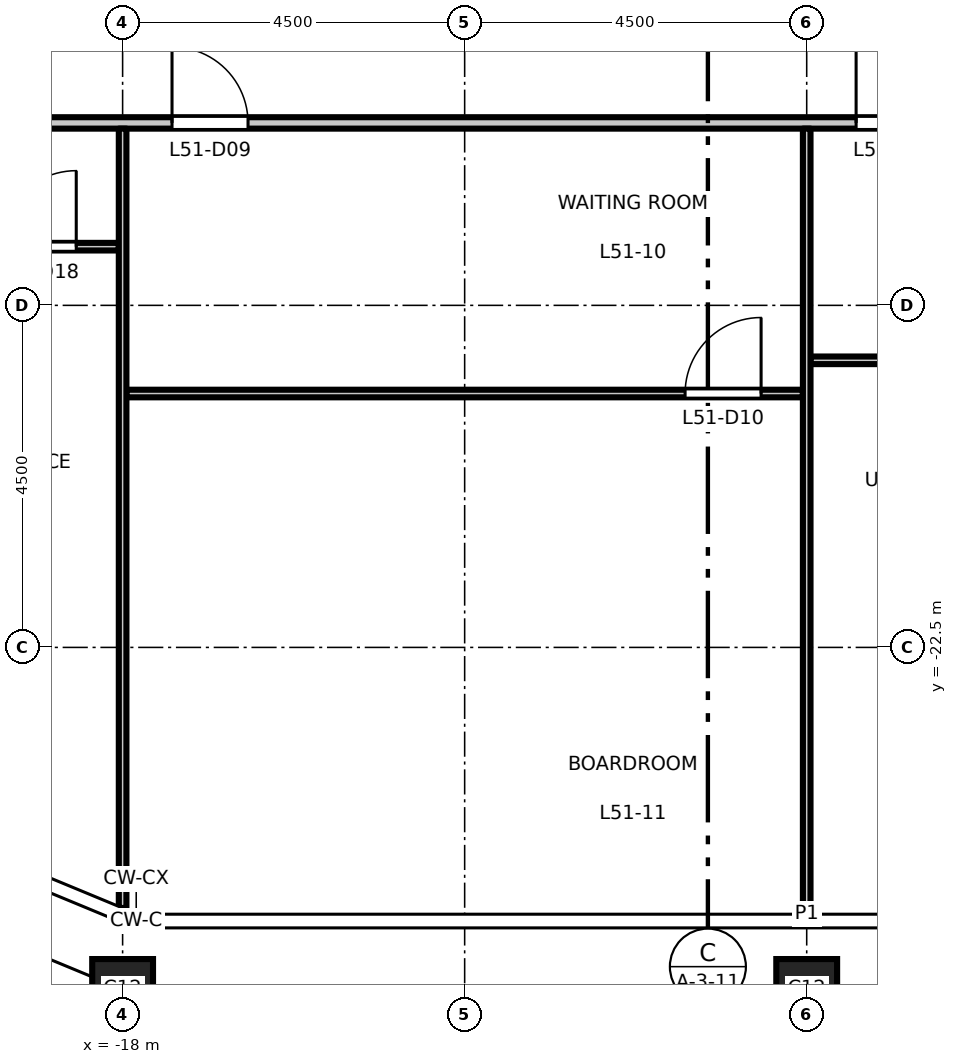
"""IFC4 building model, lengths in metres.
Left out: names, types, materials, properties, quantities, classifications, styles, units other than length and angle.
Written with IfcOpenShell. Run it as: python <this file> out.ifc"""

import sys

from ifc_helpers import new_model, si_unit, direction, frame, frame_2d, origin, origin_2d, place, context, subcontext, project, spatial, rectangle, hollow_rectangle, extrude, element, fill, save


model = new_model("IFC4")
c1 = context("Model", 3, precision=1e-05, world=origin(), true_north=direction((0.0, 1.0)))
c2 = subcontext(c1, "Body", "Model", "MODEL_VIEW")
j1 = project(units=[si_unit("LENGTHUNIT", "METRE"), si_unit("PLANEANGLEUNIT", "RADIAN")], contexts=[c1])
p1 = place(None, origin())
s1 = spatial("IfcSite", under=j1, at=p1, CompositionType="ELEMENT")
p2 = place(p1, origin())
s2 = spatial("IfcBuilding", under=s1, at=p2, CompositionType="ELEMENT")
p3 = place(p2, frame((0.0, 0.0, 237.7)))
s3 = spatial("IfcBuildingStorey", under=s2, at=p3, CompositionType="ELEMENT", Elevation=237.7)
for number, where, z_axis, x_axis in (
    (1, (-18.0, -27.0, 0.0), (0.0, 0.0, 1.0), (1.0, 0.0, 0.0)),
    (2, (-9.0, -27.0, 0.0), (0.0, 0.0, 1.0), (1.0, 0.0, 0.0)),
):
    element("IfcColumn", number, at=place(p3, frame(where, z_axis=z_axis, x_axis=x_axis)), inside=s3, PredefinedType="COLUMN", context=c2, shape_type="SweptSolid", body=[
        extrude(hollow_rectangle(XDim=0.8, YDim=0.8, WallThickness=0.045, at=origin_2d()), origin(), (0.0, 0.0, 1.0), 4.5),
    ])
p4 = place(p3, frame((-17.95, -19.16, 0.0), z_axis=(0.0, 0.0, 1.0), x_axis=(1.0, 0.0, 0.0)))
e3 = element("IfcWall", 3, at=p4, inside=s3, PredefinedType="PARTITIONING", context=c2, shape_type="SweptSolid", body=[
    extrude(rectangle(XDim=8.9, YDim=0.1, at=frame_2d((4.45, 0.0))), origin(), (0.0, 0.0, 1.0), 4.35),
])
p5 = place(p4, frame((7.35, 0.0, 0.0)))
e4 = element("IfcOpeningElement", 4, at=p5, cuts=e3, PredefinedType="OPENING", context=c2, shape_type="SweptSolid", body=[
    extrude(rectangle(XDim=1.0, YDim=2.1, at=frame_2d((0.5, 1.05))), frame((0.0, 0.06, 0.0), z_axis=(0.0, -1.0, 0.0), x_axis=(1.0, 0.0, 0.0)), (0.0, 0.0, 1.0), 0.12),
])
p6 = place(p3, frame((-8.95, -18.723, 0.0), z_axis=(0.0, 0.0, 1.0), x_axis=(1.0, 0.0, 0.0)))
e5 = element("IfcWall", 5, at=p6, inside=s3, PredefinedType="PARTITIONING", context=c2, shape_type="SweptSolid", body=[
    extrude(rectangle(XDim=8.9, YDim=0.1, at=frame_2d((4.45, 0.0))), origin(), (0.0, 0.0, 1.0), 4.35),
])
p7 = place(p6, frame((7.35, 0.0, 0.0)))
e6 = element("IfcOpeningElement", 6, at=p7, cuts=e5, PredefinedType="OPENING", context=c2, shape_type="SweptSolid", body=[
    extrude(rectangle(XDim=1.0, YDim=2.1, at=frame_2d((0.5, 1.05))), frame((0.0, 0.06, 0.0), z_axis=(0.0, -1.0, 0.0), x_axis=(1.0, 0.0, 0.0)), (0.0, 0.0, 1.0), 0.12),
])
p8 = place(p3, frame((-26.01, -17.228, 0.0), z_axis=(0.0, 0.0, 1.0), x_axis=(1.0, 0.0, 0.0)))
e7 = element("IfcWall", 7, at=p8, inside=s3, PredefinedType="PARTITIONING", context=c2, shape_type="SweptSolid", body=[
    extrude(rectangle(XDim=7.96, YDim=0.1, at=frame_2d((3.98, 0.0))), origin(), (0.0, 0.0, 1.0), 4.35),
])
p9 = place(p8, frame((6.4, 0.0, 0.0)))
e8 = element("IfcOpeningElement", 8, at=p9, cuts=e7, PredefinedType="OPENING", context=c2, shape_type="SweptSolid", body=[
    extrude(rectangle(XDim=1.0, YDim=2.1, at=frame_2d((0.5, 1.05))), frame((0.0, 0.06, 0.0), z_axis=(0.0, -1.0, 0.0), x_axis=(1.0, 0.0, 0.0)), (0.0, 0.0, 1.0), 0.12),
])
p10 = place(p3, frame((-23.925, -15.6, 0.0), z_axis=(0.0, 0.0, 1.0), x_axis=(1.0, 0.0, 0.0)))
e9 = element("IfcWall", 9, at=p10, inside=s3, PredefinedType="PARTITIONING", context=c2, shape_type="SweptSolid", body=[
    extrude(rectangle(XDim=47.85, YDim=0.15, at=frame_2d((23.925, 0.0))), origin(), (0.0, 0.0, 1.0), 4.35),
])
p11 = place(p10, frame((6.575, 0.0, 0.0)))
e10 = element("IfcOpeningElement", 10, at=p11, cuts=e9, PredefinedType="OPENING", context=c2, shape_type="SweptSolid", body=[
    extrude(rectangle(XDim=1.0, YDim=2.1, at=frame_2d((0.5, 1.05))), frame((0.0, 0.085, 0.0), z_axis=(0.0, -1.0, 0.0), x_axis=(1.0, 0.0, 0.0)), (0.0, 0.0, 1.0), 0.17),
])
p12 = place(p10, frame((15.575, 0.0, 0.0)))
e11 = element("IfcOpeningElement", 11, at=p12, cuts=e9, PredefinedType="OPENING", context=c2, shape_type="SweptSolid", body=[
    extrude(rectangle(XDim=1.0, YDim=2.1, at=frame_2d((0.5, 1.05))), frame((0.0, 0.085, 0.0), z_axis=(0.0, -1.0, 0.0), x_axis=(1.0, 0.0, 0.0)), (0.0, 0.0, 1.0), 0.17),
])
p13 = place(p10, frame((24.575, 0.0, 0.0)))
e12 = element("IfcOpeningElement", 12, at=p13, cuts=e9, PredefinedType="OPENING", context=c2, shape_type="SweptSolid", body=[
    extrude(rectangle(XDim=1.0, YDim=2.1, at=frame_2d((0.5, 1.05))), frame((0.0, 0.085, 0.0), z_axis=(0.0, -1.0, 0.0), x_axis=(1.0, 0.0, 0.0)), (0.0, 0.0, 1.0), 0.17),
])
p14 = place(p10, frame((40.325, 0.0, 0.0)))
e13 = element("IfcOpeningElement", 13, at=p14, cuts=e9, PredefinedType="OPENING", context=c2, shape_type="SweptSolid", body=[
    extrude(rectangle(XDim=1.0, YDim=2.1, at=frame_2d((0.5, 1.05))), frame((0.0, 0.085, 0.0), z_axis=(0.0, -1.0, 0.0), x_axis=(1.0, 0.0, 0.0)), (0.0, 0.0, 1.0), 0.17),
])
p15 = place(p10, frame((0.725, 0.0, 0.0)))
e14 = element("IfcOpeningElement", 14, at=p15, cuts=e9, PredefinedType="OPENING", context=c2, shape_type="SweptSolid", body=[
    extrude(rectangle(XDim=1.0, YDim=2.1, at=frame_2d((0.5, 1.05))), frame((0.0, 0.085, 0.0), z_axis=(0.0, -1.0, 0.0), x_axis=(1.0, 0.0, 0.0)), (0.0, 0.0, 1.0), 0.17),
])
p16 = place(p10, frame((42.575, 0.0, 0.0)))
e15 = element("IfcOpeningElement", 15, at=p16, cuts=e9, PredefinedType="OPENING", context=c2, shape_type="SweptSolid", body=[
    extrude(rectangle(XDim=1.0, YDim=2.1, at=frame_2d((0.5, 1.05))), frame((0.0, 0.085, 0.0), z_axis=(0.0, -1.0, 0.0), x_axis=(1.0, 0.0, 0.0)), (0.0, 0.0, 1.0), 0.17),
])
p17 = place(p3, frame((-18.0, -25.928, 0.0), z_axis=(0.0, 0.0, 1.0), x_axis=(0.0, 1.0, 0.0)))
e16 = element("IfcWall", 16, at=p17, inside=s3, PredefinedType="PARTITIONING", context=c2, shape_type="SweptSolid", body=[
    extrude(rectangle(XDim=10.253, YDim=0.1, at=frame_2d((5.126, 0.0))), origin(), (0.0, 0.0, 1.0), 3.65),
])
p18 = place(p3, frame((-9.0, -26.01, 0.0), z_axis=(0.0, 0.0, 1.0), x_axis=(0.0, 1.0, 0.0)))
e17 = element("IfcWall", 17, at=p18, inside=s3, PredefinedType="PARTITIONING", context=c2, shape_type="SweptSolid", body=[
    extrude(rectangle(XDim=10.335, YDim=0.1, at=frame_2d((5.167, 0.0))), origin(), (0.0, 0.0, 1.0), 3.65),
])
p19 = place(p11, origin())
e18 = element("IfcDoor", 18, at=p19, inside=s3, OperationType="SINGLE_SWING_LEFT", PredefinedType="DOOR", context=c2, shape_type="SweptSolid", body=[
    extrude(rectangle(XDim=1.0, YDim=2.1, at=frame_2d((0.5, 1.05))), frame((0.0, 0.025, 0.0), z_axis=(0.0, -1.0, 0.0), x_axis=(1.0, 0.0, 0.0)), (0.0, 0.0, 1.0), 0.05),
])
fill(e10, e18)
p20 = place(p5, origin())
e19 = element("IfcDoor", 19, at=p20, inside=s3, OperationType="SINGLE_SWING_RIGHT", PredefinedType="DOOR", context=c2, shape_type="SweptSolid", body=[
    extrude(rectangle(XDim=1.0, YDim=2.1, at=frame_2d((0.5, 1.05))), frame((0.0, 0.025, 0.0), z_axis=(0.0, -1.0, 0.0), x_axis=(1.0, 0.0, 0.0)), (0.0, 0.0, 1.0), 0.05),
])
fill(e4, e19)
p21 = place(p12, origin())
e20 = element("IfcDoor", 20, at=p21, inside=s3, OperationType="SINGLE_SWING_LEFT", PredefinedType="DOOR", context=c2, shape_type="SweptSolid", body=[
    extrude(rectangle(XDim=1.0, YDim=2.1, at=frame_2d((0.5, 1.05))), frame((0.0, 0.025, 0.0), z_axis=(0.0, -1.0, 0.0), x_axis=(1.0, 0.0, 0.0)), (0.0, 0.0, 1.0), 0.05),
])
fill(e11, e20)
p22 = place(p9, origin())
e21 = element("IfcDoor", 21, at=p22, inside=s3, OperationType="SINGLE_SWING_RIGHT", PredefinedType="DOOR", context=c2, shape_type="SweptSolid", body=[
    extrude(rectangle(XDim=1.0, YDim=2.1, at=frame_2d((0.5, 1.05))), frame((0.0, 0.025, 0.0), z_axis=(0.0, -1.0, 0.0), x_axis=(1.0, 0.0, 0.0)), (0.0, 0.0, 1.0), 0.05),
])
fill(e8, e21)
save(model, sys.argv[1])
